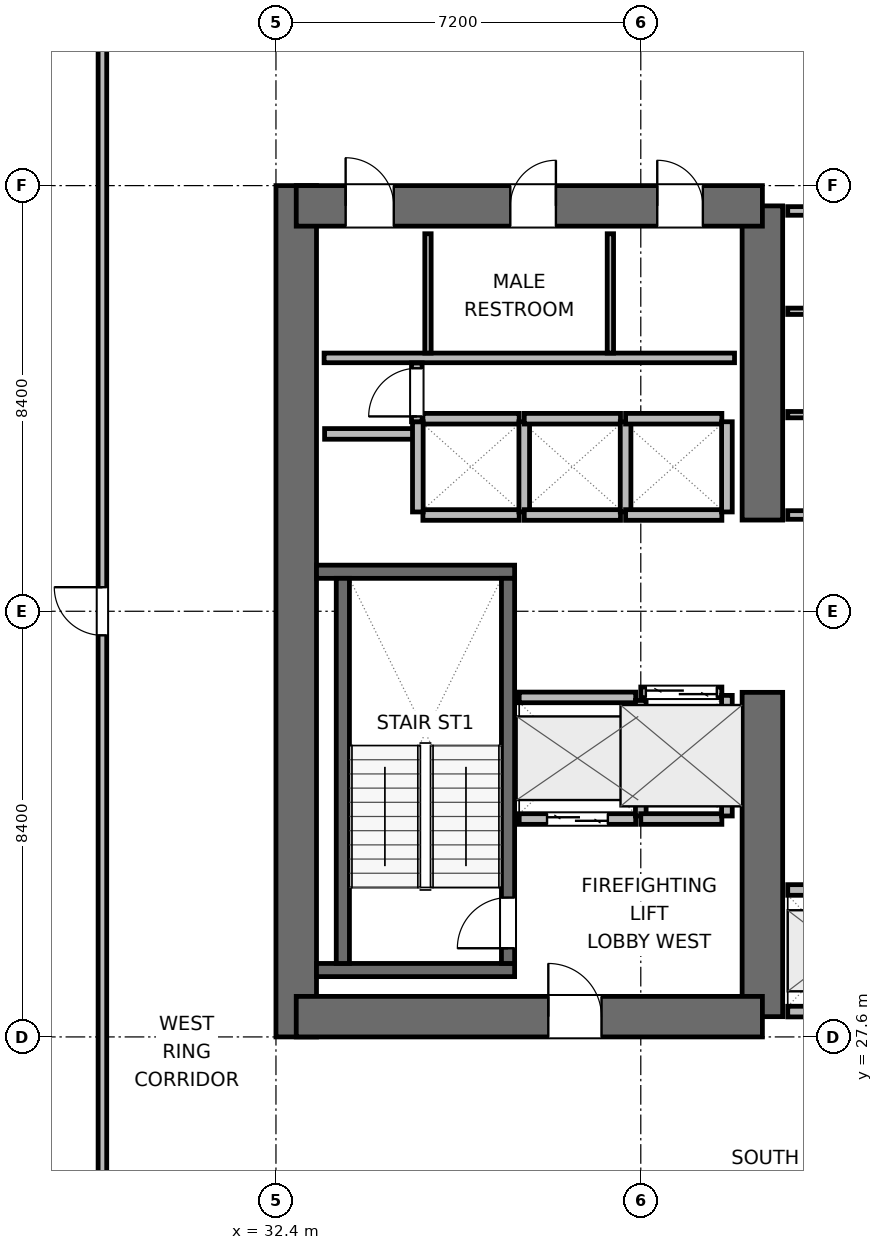
"""IFC4 building model, lengths in metres.
Left out: names, types, materials, properties, quantities, classifications, styles, units other than length and angle.
Written with IfcOpenShell. Run it as: python <this file> out.ifc"""

import sys

from ifc_helpers import new_model, si_unit, direction, frame, frame_2d, origin, place, context, subcontext, project, spatial, rectangle, extrude, element, fill, save


model = new_model("IFC4")
c1 = context("Model", 3, precision=1e-05, world=origin(), true_north=direction((0.0, 1.0)))
c2 = subcontext(c1, "Body", "Model", "MODEL_VIEW")
j1 = project(units=[si_unit("LENGTHUNIT", "METRE"), si_unit("PLANEANGLEUNIT", "RADIAN")], contexts=[c1])
p1 = place(None, origin())
s1 = spatial("IfcSite", under=j1, at=p1, CompositionType="ELEMENT")
p2 = place(p1, origin())
s2 = spatial("IfcBuilding", under=s1, at=p2, CompositionType="ELEMENT")
p3 = place(p2, frame((0.0, 0.0, 97.5)))
s3 = spatial("IfcBuildingStorey", under=s2, at=p3, CompositionType="ELEMENT", Elevation=97.5)
p4 = place(p3, frame((32.8, 27.6, 0.0), z_axis=(0.0, 0.0, 1.0), x_axis=(0.0, 1.0, 0.0)))
e1 = element("IfcWall", 1, at=p4, inside=s3, PredefinedType="SHEAR", context=c2, shape_type="SweptSolid", body=[
    extrude(rectangle(XDim=16.8, YDim=0.8, at=frame_2d((8.4, 0.0))), origin(), (0.0, 0.0, 1.0), 3.9),
])
p5 = place(p3, frame((42.0, 28.0, 0.0), z_axis=(0.0, 0.0, 1.0), x_axis=(0.0, 1.0, 0.0)))
e2 = element("IfcWall", 2, at=p5, inside=s3, PredefinedType="SHEAR", context=c2, shape_type="SweptSolid", body=[
    extrude(rectangle(XDim=6.4, YDim=0.8, at=frame_2d((3.2, 0.0))), origin(), (0.0, 0.0, 1.0), 3.9),
])
p6 = place(p3, frame((42.0, 37.8, 0.0), z_axis=(0.0, 0.0, 1.0), x_axis=(0.0, 1.0, 0.0)))
e3 = element("IfcWall", 3, at=p6, inside=s3, PredefinedType="SHEAR", context=c2, shape_type="SweptSolid", body=[
    extrude(rectangle(XDim=6.2, YDim=0.8, at=frame_2d((3.1, 0.0))), origin(), (0.0, 0.0, 1.0), 3.9),
])
p7 = place(p3, frame((32.8, 28.0, 0.0), z_axis=(0.0, 0.0, 1.0), x_axis=(1.0, 0.0, 0.0)))
e4 = element("IfcWall", 4, at=p7, inside=s3, PredefinedType="SHEAR", context=c2, shape_type="SweptSolid", body=[
    extrude(rectangle(XDim=9.2, YDim=0.8, at=frame_2d((4.6, 0.0))), origin(), (0.0, 0.0, 1.0), 3.9),
])
p8 = place(p7, frame((4.975, 0.0, 0.0)))
e5 = element("IfcOpeningElement", 5, at=p8, cuts=e4, PredefinedType="OPENING", context=c2, shape_type="SweptSolid", body=[
    extrude(rectangle(XDim=1.05, YDim=2.04, at=frame_2d((0.525, 1.02))), frame((0.0, 0.41, 0.0), z_axis=(0.0, -1.0, 0.0), x_axis=(1.0, 0.0, 0.0)), (0.0, 0.0, 1.0), 0.82),
])
p9 = place(p3, frame((32.8, 44.0, 0.0), z_axis=(0.0, 0.0, 1.0), x_axis=(1.0, 0.0, 0.0)))
e6 = element("IfcWall", 6, at=p9, inside=s3, PredefinedType="SHEAR", context=c2, shape_type="SweptSolid", body=[
    extrude(rectangle(XDim=9.2, YDim=0.8, at=frame_2d((4.6, 0.0))), origin(), (0.0, 0.0, 1.0), 3.9),
])
p10 = place(p9, frame((0.975, 0.0, 0.0)))
e7 = element("IfcOpeningElement", 7, at=p10, cuts=e6, PredefinedType="OPENING", context=c2, shape_type="SweptSolid", body=[
    extrude(rectangle(XDim=0.95, YDim=2.04, at=frame_2d((0.475, 1.02))), frame((0.0, 0.41, 0.0), z_axis=(0.0, -1.0, 0.0), x_axis=(1.0, 0.0, 0.0)), (0.0, 0.0, 1.0), 0.82),
])
p11 = place(p9, frame((4.225, 0.0, 0.0)))
e8 = element("IfcOpeningElement", 8, at=p11, cuts=e6, PredefinedType="OPENING", context=c2, shape_type="SweptSolid", body=[
    extrude(rectangle(XDim=0.9, YDim=2.02, at=frame_2d((0.45, 1.01))), frame((0.0, 0.41, 0.0), z_axis=(0.0, -1.0, 0.0), x_axis=(1.0, 0.0, 0.0)), (0.0, 0.0, 1.0), 0.82),
])
p12 = place(p9, frame((7.125, 0.0, 0.0)))
e9 = element("IfcOpeningElement", 9, at=p12, cuts=e6, PredefinedType="OPENING", context=c2, shape_type="SweptSolid", body=[
    extrude(rectangle(XDim=0.9, YDim=2.02, at=frame_2d((0.45, 1.01))), frame((0.0, 0.41, 0.0), z_axis=(0.0, -1.0, 0.0), x_axis=(1.0, 0.0, 0.0)), (0.0, 0.0, 1.0), 0.82),
])
for number, where, z_axis, x_axis in (
    (10, (33.2, 28.92, 0.0), (0.0, 0.0, 1.0), (1.0, 0.0, 0.0)),
    (11, (33.2, 36.78, 0.0), (0.0, 0.0, 1.0), (1.0, 0.0, 0.0)),
):
    element("IfcWall", number, at=place(p3, frame(where, z_axis=z_axis, x_axis=x_axis)), inside=s3, PredefinedType="SHEAR", context=c2, shape_type="SweptSolid", body=[
        extrude(rectangle(XDim=3.91, YDim=0.26, at=frame_2d((1.955, 0.0))), origin(), (0.0, 0.0, 1.0), 3.9),
    ])
p13 = place(p3, frame((33.72, 29.05, 0.0), z_axis=(0.0, 0.0, 1.0), x_axis=(0.0, 1.0, 0.0)))
e12 = element("IfcWall", 12, at=p13, inside=s3, PredefinedType="SHEAR", context=c2, shape_type="SweptSolid", body=[
    extrude(rectangle(XDim=7.6, YDim=0.26, at=frame_2d((3.8, 0.0))), origin(), (0.0, 0.0, 1.0), 3.9),
])
p14 = place(p3, frame((36.98, 29.05, 0.0), z_axis=(0.0, 0.0, 1.0), x_axis=(0.0, 1.0, 0.0)))
e13 = element("IfcWall", 13, at=p14, inside=s3, PredefinedType="SHEAR", context=c2, shape_type="SweptSolid", body=[
    extrude(rectangle(XDim=7.6, YDim=0.26, at=frame_2d((3.8, 0.0))), origin(), (0.0, 0.0, 1.0), 3.9),
])
p15 = place(p14, frame((0.3, 0.0, 0.0)))
e14 = element("IfcOpeningElement", 14, at=p15, cuts=e13, PredefinedType="OPENING", context=c2, shape_type="SweptSolid", body=[
    extrude(rectangle(XDim=1.0, YDim=2.04, at=frame_2d((0.5, 1.02))), frame((0.0, 0.14, 0.0), z_axis=(0.0, -1.0, 0.0), x_axis=(1.0, 0.0, 0.0)), (0.0, 0.0, 1.0), 0.28),
])
p16 = place(p3, frame((33.35, 41.0, 0.0), z_axis=(0.0, 0.0, 1.0), x_axis=(1.0, 0.0, 0.0)))
e15 = element("IfcWall", 15, at=p16, inside=s3, PredefinedType="PLUMBINGWALL", context=c2, shape_type="SweptSolid", body=[
    extrude(rectangle(XDim=8.1, YDim=0.19, at=frame_2d((4.05, 0.0))), origin(), (0.0, 0.0, 1.0), 3.64),
])
for number, where, z_axis, x_axis in (
    (16, (35.4, 41.095, 0.0), (0.0, 0.0, 1.0), (0.0, 1.0, 0.0)),
    (17, (39.0, 41.095, 0.0), (0.0, 0.0, 1.0), (0.0, 1.0, 0.0)),
):
    element("IfcWall", number, at=place(p3, frame(where, z_axis=z_axis, x_axis=x_axis)), inside=s3, PredefinedType="PARTITIONING", context=c2, shape_type="SweptSolid", body=[
        extrude(rectangle(XDim=2.355, YDim=0.125, at=frame_2d((1.177, 0.0))), origin(), (0.0, 0.0, 1.0), 3.64),
    ])
p17 = place(p3, frame((33.36, 39.5, 0.0), z_axis=(0.0, 0.0, 1.0), x_axis=(1.0, 0.0, 0.0)))
e18 = element("IfcWall", 18, at=p17, inside=s3, PredefinedType="PARTITIONING", context=c2, shape_type="SweptSolid", body=[
    extrude(rectangle(XDim=1.86, YDim=0.21, at=frame_2d((0.93, 0.0))), origin(), (0.0, 0.0, 1.0), 3.64),
])
p18 = place(p3, frame((37.2, 31.9, 0.0), z_axis=(0.0, 0.0, 1.0), x_axis=(1.0, 0.0, 0.0)))
e19 = element("IfcWall", 19, at=p18, inside=s3, PredefinedType="PARTITIONING", context=c2, shape_type="SweptSolid", body=[
    extrude(rectangle(XDim=2.3, YDim=0.21, at=frame_2d((1.15, 0.0))), origin(), (0.0, 0.0, 1.0), 3.64),
])
p19 = place(p18, frame((0.55, 0.0, 0.0)))
e20 = element("IfcOpeningElement", 20, at=p19, cuts=e19, PredefinedType="OPENING", context=c2, shape_type="SweptSolid", body=[
    extrude(rectangle(XDim=1.2, YDim=2.04, at=frame_2d((0.6, 1.02))), frame((0.0, 0.115, 0.0), z_axis=(0.0, -1.0, 0.0), x_axis=(1.0, 0.0, 0.0)), (0.0, 0.0, 1.0), 0.23),
])
p20 = place(p3, frame((37.2, 34.3, 0.0), z_axis=(0.0, 0.0, 1.0), x_axis=(1.0, 0.0, 0.0)))
e21 = element("IfcWall", 21, at=p20, inside=s3, PredefinedType="PARTITIONING", context=c2, shape_type="SweptSolid", body=[
    extrude(rectangle(XDim=2.3, YDim=0.21, at=frame_2d((1.15, 0.0))), origin(), (0.0, 0.0, 1.0), 3.64),
])
p21 = place(p3, frame((39.6, 31.96, 0.0), z_axis=(0.0, 0.0, 1.0), x_axis=(0.0, 1.0, 0.0)))
e22 = element("IfcWall", 22, at=p21, inside=s3, PredefinedType="PARTITIONING", context=c2, shape_type="SweptSolid", body=[
    extrude(rectangle(XDim=2.28, YDim=0.21, at=frame_2d((1.14, 0.0))), origin(), (0.0, 0.0, 1.0), 3.64),
])
p22 = place(p3, frame((39.6, 34.4, 0.0), z_axis=(0.0, 0.0, 1.0), x_axis=(1.0, 0.0, 0.0)))
e23 = element("IfcWall", 23, at=p22, inside=s3, PredefinedType="PARTITIONING", context=c2, shape_type="SweptSolid", body=[
    extrude(rectangle(XDim=1.6, YDim=0.21, at=frame_2d((0.8, 0.0))), origin(), (0.0, 0.0, 1.0), 3.64),
])
p23 = place(p22, frame((0.1, 0.0, 0.0)))
e24 = element("IfcOpeningElement", 24, at=p23, cuts=e23, PredefinedType="OPENING", context=c2, shape_type="SweptSolid", body=[
    extrude(rectangle(XDim=1.4, YDim=2.06, at=frame_2d((0.7, 1.03))), frame((0.0, 0.115, 0.0), z_axis=(0.0, -1.0, 0.0), x_axis=(1.0, 0.0, 0.0)), (0.0, 0.0, 1.0), 0.23),
])
p24 = place(p3, frame((39.6, 31.9, 0.0), z_axis=(0.0, 0.0, 1.0), x_axis=(1.0, 0.0, 0.0)))
e25 = element("IfcWall", 25, at=p24, inside=s3, PredefinedType="PARTITIONING", context=c2, shape_type="SweptSolid", body=[
    extrude(rectangle(XDim=1.6, YDim=0.21, at=frame_2d((0.8, 0.0))), origin(), (0.0, 0.0, 1.0), 3.64),
])
p25 = place(p3, frame((41.3, 31.96, 0.0), z_axis=(0.0, 0.0, 1.0), x_axis=(0.0, 1.0, 0.0)))
e26 = element("IfcWall", 26, at=p25, inside=s3, PredefinedType="PARTITIONING", context=c2, shape_type="SweptSolid", body=[
    extrude(rectangle(XDim=2.38, YDim=0.21, at=frame_2d((1.19, 0.0))), origin(), (0.0, 0.0, 1.0), 3.64),
])
p26 = place(p3, frame((42.5, 30.5, 0.0), z_axis=(0.0, 0.0, 1.0), x_axis=(1.0, 0.0, 0.0)))
e27 = element("IfcWall", 27, at=p26, inside=s3, PredefinedType="PARTITIONING", context=c2, shape_type="SweptSolid", body=[
    extrude(rectangle(XDim=2.1, YDim=0.21, at=frame_2d((1.05, 0.0))), origin(), (0.0, 0.0, 1.0), 3.64),
])
p27 = place(p26, frame((0.5, 0.0, 0.0)))
e28 = element("IfcOpeningElement", 28, at=p27, cuts=e27, PredefinedType="OPENING", context=c2, shape_type="SweptSolid", body=[
    extrude(rectangle(XDim=1.1, YDim=2.04, at=frame_2d((0.55, 1.02))), frame((0.0, 0.115, 0.0), z_axis=(0.0, -1.0, 0.0), x_axis=(1.0, 0.0, 0.0)), (0.0, 0.0, 1.0), 0.23),
])
p28 = place(p3, frame((42.5, 28.1, 0.0), z_axis=(0.0, 0.0, 1.0), x_axis=(1.0, 0.0, 0.0)))
e29 = element("IfcWall", 29, at=p28, inside=s3, PredefinedType="PARTITIONING", context=c2, shape_type="SweptSolid", body=[
    extrude(rectangle(XDim=2.1, YDim=0.21, at=frame_2d((1.05, 0.0))), origin(), (0.0, 0.0, 1.0), 2.525),
])
for number, where, z_axis, x_axis in (
    (30, (35.3, 37.9, 0.0), (0.0, 0.0, 1.0), (1.0, 0.0, 0.0)),
    (31, (35.3, 39.8, 0.0), (0.0, 0.0, 1.0), (1.0, 0.0, 0.0)),
):
    element("IfcWall", number, at=place(p3, frame(where, z_axis=z_axis, x_axis=x_axis)), inside=s3, PredefinedType="PARTITIONING", context=c2, shape_type="SweptSolid", body=[
        extrude(rectangle(XDim=1.9, YDim=0.21, at=frame_2d((0.95, 0.0))), origin(), (0.0, 0.0, 1.0), 3.64),
    ])
for number, where, z_axis, x_axis in (
    (32, (35.2, 37.96, 0.0), (0.0, 0.0, 1.0), (0.0, 1.0, 0.0)),
    (33, (37.3, 37.96, 0.0), (0.0, 0.0, 1.0), (0.0, 1.0, 0.0)),
):
    element("IfcWall", number, at=place(p3, frame(where, z_axis=z_axis, x_axis=x_axis)), inside=s3, PredefinedType="PARTITIONING", context=c2, shape_type="SweptSolid", body=[
        extrude(rectangle(XDim=1.78, YDim=0.21, at=frame_2d((0.89, 0.0))), origin(), (0.0, 0.0, 1.0), 3.64),
    ])
for number, where, z_axis, x_axis in (
    (34, (37.3, 37.9, 0.0), (0.0, 0.0, 1.0), (1.0, 0.0, 0.0)),
    (35, (37.3, 39.8, 0.0), (0.0, 0.0, 1.0), (1.0, 0.0, 0.0)),
):
    element("IfcWall", number, at=place(p3, frame(where, z_axis=z_axis, x_axis=x_axis)), inside=s3, PredefinedType="PARTITIONING", context=c2, shape_type="SweptSolid", body=[
        extrude(rectangle(XDim=1.9, YDim=0.21, at=frame_2d((0.95, 0.0))), origin(), (0.0, 0.0, 1.0), 3.64),
    ])
p29 = place(p3, frame((39.3, 37.96, 0.0), z_axis=(0.0, 0.0, 1.0), x_axis=(0.0, 1.0, 0.0)))
e36 = element("IfcWall", 36, at=p29, inside=s3, PredefinedType="PARTITIONING", context=c2, shape_type="SweptSolid", body=[
    extrude(rectangle(XDim=1.78, YDim=0.21, at=frame_2d((0.89, 0.0))), origin(), (0.0, 0.0, 1.0), 3.64),
])
for number, where, z_axis, x_axis in (
    (37, (39.3, 37.9, 0.0), (0.0, 0.0, 1.0), (1.0, 0.0, 0.0)),
    (38, (39.3, 39.8, 0.0), (0.0, 0.0, 1.0), (1.0, 0.0, 0.0)),
):
    element("IfcWall", number, at=place(p3, frame(where, z_axis=z_axis, x_axis=x_axis)), inside=s3, PredefinedType="PARTITIONING", context=c2, shape_type="SweptSolid", body=[
        extrude(rectangle(XDim=1.9, YDim=0.21, at=frame_2d((0.95, 0.0))), origin(), (0.0, 0.0, 1.0), 3.64),
    ])
p30 = place(p3, frame((41.3, 37.96, 0.0), z_axis=(0.0, 0.0, 1.0), x_axis=(0.0, 1.0, 0.0)))
e39 = element("IfcWall", 39, at=p30, inside=s3, PredefinedType="PARTITIONING", context=c2, shape_type="SweptSolid", body=[
    extrude(rectangle(XDim=1.78, YDim=0.21, at=frame_2d((0.89, 0.0))), origin(), (0.0, 0.0, 1.0), 3.64),
])
p31 = place(p3, frame((35.18, 39.74, 0.0), z_axis=(0.0, 0.0, 1.0), x_axis=(0.0, 1.0, 0.0)))
e40 = element("IfcWall", 40, at=p31, inside=s3, PredefinedType="PARTITIONING", context=c2, shape_type="SweptSolid", body=[
    extrude(rectangle(XDim=1.16, YDim=0.21, at=frame_2d((0.58, 0.0))), origin(), (0.0, 0.0, 1.0), 3.64),
])
p32 = place(p31, frame((0.105, 0.0, 0.0)))
e41 = element("IfcOpeningElement", 41, at=p32, cuts=e40, PredefinedType="OPENING", context=c2, shape_type="SweptSolid", body=[
    extrude(rectangle(XDim=0.95, YDim=2.04, at=frame_2d((0.475, 1.02))), frame((0.0, 0.115, 0.0), z_axis=(0.0, -1.0, 0.0), x_axis=(1.0, 0.0, 0.0)), (0.0, 0.0, 1.0), 0.23),
])
p33 = place(p3, frame((42.5, 37.9, 0.0), z_axis=(0.0, 0.0, 1.0), x_axis=(1.0, 0.0, 0.0)))
e42 = element("IfcWall", 42, at=p33, inside=s3, PredefinedType="PARTITIONING", context=c2, shape_type="SweptSolid", body=[
    extrude(rectangle(XDim=4.213, YDim=0.17, at=frame_2d((2.106, 0.0))), origin(), (0.0, 0.0, 1.0), 3.64),
])
p34 = place(p3, frame((42.5, 43.9, 0.0), z_axis=(0.0, 0.0, 1.0), x_axis=(1.0, 0.0, 0.0)))
e43 = element("IfcWall", 43, at=p34, inside=s3, PredefinedType="PARTITIONING", context=c2, shape_type="SweptSolid", body=[
    extrude(rectangle(XDim=4.213, YDim=0.17, at=frame_2d((2.106, 0.0))), origin(), (0.0, 0.0, 1.0), 2.525),
])
for number, where, z_axis, x_axis in (
    (44, (42.5, 39.88, 0.0), (0.0, 0.0, 1.0), (1.0, 0.0, 0.0)),
    (45, (42.5, 41.92, 0.0), (0.0, 0.0, 1.0), (1.0, 0.0, 0.0)),
):
    element("IfcWall", number, at=place(p3, frame(where, z_axis=z_axis, x_axis=x_axis)), inside=s3, PredefinedType="PARTITIONING", context=c2, shape_type="SweptSolid", body=[
        extrude(rectangle(XDim=4.213, YDim=0.125, at=frame_2d((2.106, 0.0))), origin(), (0.0, 0.0, 1.0), 3.64),
    ])
p35 = place(p3, frame((28.975, 23.987, 0.0), z_axis=(0.0, 0.0, 1.0), x_axis=(0.0, 1.0, 0.0)))
e46 = element("IfcWall", 46, at=p35, inside=s3, PredefinedType="PARTITIONING", context=c2, shape_type="SweptSolid", body=[
    extrude(rectangle(XDim=24.026, YDim=0.17, at=frame_2d((12.013, 0.0))), origin(), (0.0, 0.0, 1.0), 3.64),
])
p36 = place(p35, frame((11.538, 0.0, 0.0)))
e47 = element("IfcOpeningElement", 47, at=p36, cuts=e46, PredefinedType="OPENING", context=c2, shape_type="SweptSolid", body=[
    extrude(rectangle(XDim=0.95, YDim=2.04, at=frame_2d((0.475, 1.02))), frame((0.0, 0.095, 0.0), z_axis=(0.0, -1.0, 0.0), x_axis=(1.0, 0.0, 0.0)), (0.0, 0.0, 1.0), 0.19),
])
p37 = place(p15, origin())
e48 = element("IfcDoor", 48, at=p37, inside=s3, OperationType="SINGLE_SWING_LEFT", PredefinedType="DOOR", context=c2, shape_type="SweptSolid", body=[
    extrude(rectangle(XDim=1.0, YDim=2.04, at=frame_2d((0.5, 1.02))), frame((0.0, 0.025, 0.0), z_axis=(0.0, -1.0, 0.0), x_axis=(1.0, 0.0, 0.0)), (0.0, 0.0, 1.0), 0.05),
])
fill(e14, e48)
p38 = place(p19, origin())
e49 = element("IfcDoor", 49, at=p38, inside=s3, OperationType="DOUBLE_DOOR_SLIDING", PredefinedType="DOOR", context=c2, shape_type="SweptSolid", body=[
    extrude(rectangle(XDim=1.2, YDim=2.04, at=frame_2d((0.6, 1.02))), frame((0.0, 0.025, 0.0), z_axis=(0.0, -1.0, 0.0), x_axis=(1.0, 0.0, 0.0)), (0.0, 0.0, 1.0), 0.05),
])
fill(e20, e49)
p39 = place(p23, origin())
e50 = element("IfcDoor", 50, at=p39, inside=s3, OperationType="DOUBLE_DOOR_SLIDING", PredefinedType="DOOR", context=c2, shape_type="SweptSolid", body=[
    extrude(rectangle(XDim=1.4, YDim=2.06, at=frame_2d((0.7, 1.03))), frame((0.0, 0.025, 0.0), z_axis=(0.0, -1.0, 0.0), x_axis=(1.0, 0.0, 0.0)), (0.0, 0.0, 1.0), 0.05),
])
fill(e24, e50)
p40 = place(p8, origin())
e51 = element("IfcDoor", 51, at=p40, inside=s3, OperationType="SINGLE_SWING_LEFT", PredefinedType="DOOR", context=c2, shape_type="SweptSolid", body=[
    extrude(rectangle(XDim=1.05, YDim=2.04, at=frame_2d((0.525, 1.02))), frame((0.0, 0.025, 0.0), z_axis=(0.0, -1.0, 0.0), x_axis=(1.0, 0.0, 0.0)), (0.0, 0.0, 1.0), 0.05),
])
fill(e5, e51)
p41 = place(p10, origin())
e52 = element("IfcDoor", 52, at=p41, inside=s3, OperationType="SINGLE_SWING_LEFT", PredefinedType="DOOR", context=c2, shape_type="SweptSolid", body=[
    extrude(rectangle(XDim=0.95, YDim=2.04, at=frame_2d((0.475, 1.02))), frame((0.0, 0.025, 0.0), z_axis=(0.0, -1.0, 0.0), x_axis=(1.0, 0.0, 0.0)), (0.0, 0.0, 1.0), 0.05),
])
fill(e7, e52)
p42 = place(p11, origin())
e53 = element("IfcDoor", 53, at=p42, inside=s3, OperationType="SINGLE_SWING_RIGHT", PredefinedType="DOOR", context=c2, shape_type="SweptSolid", body=[
    extrude(rectangle(XDim=0.9, YDim=2.02, at=frame_2d((0.45, 1.01))), frame((0.0, 0.025, 0.0), z_axis=(0.0, -1.0, 0.0), x_axis=(1.0, 0.0, 0.0)), (0.0, 0.0, 1.0), 0.05),
])
fill(e8, e53)
p43 = place(p12, origin())
e54 = element("IfcDoor", 54, at=p43, inside=s3, OperationType="SINGLE_SWING_LEFT", PredefinedType="DOOR", context=c2, shape_type="SweptSolid", body=[
    extrude(rectangle(XDim=0.9, YDim=2.02, at=frame_2d((0.45, 1.01))), frame((0.0, 0.025, 0.0), z_axis=(0.0, -1.0, 0.0), x_axis=(1.0, 0.0, 0.0)), (0.0, 0.0, 1.0), 0.05),
])
fill(e9, e54)
p44 = place(p32, origin())
e55 = element("IfcDoor", 55, at=p44, inside=s3, OperationType="SINGLE_SWING_LEFT", PredefinedType="DOOR", context=c2, shape_type="SweptSolid", body=[
    extrude(rectangle(XDim=0.95, YDim=2.04, at=frame_2d((0.475, 1.02))), frame((0.0, 0.025, 0.0), z_axis=(0.0, -1.0, 0.0), x_axis=(1.0, 0.0, 0.0)), (0.0, 0.0, 1.0), 0.05),
])
fill(e41, e55)
p45 = place(p36, origin())
e56 = element("IfcDoor", 56, at=p45, inside=s3, OperationType="SINGLE_SWING_RIGHT", PredefinedType="DOOR", context=c2, shape_type="SweptSolid", body=[
    extrude(rectangle(XDim=0.95, YDim=2.04, at=frame_2d((0.475, 1.02))), frame((0.0, 0.025, 0.0), z_axis=(0.0, -1.0, 0.0), x_axis=(1.0, 0.0, 0.0)), (0.0, 0.0, 1.0), 0.05),
])
fill(e47, e56)
save(model, sys.argv[1])
